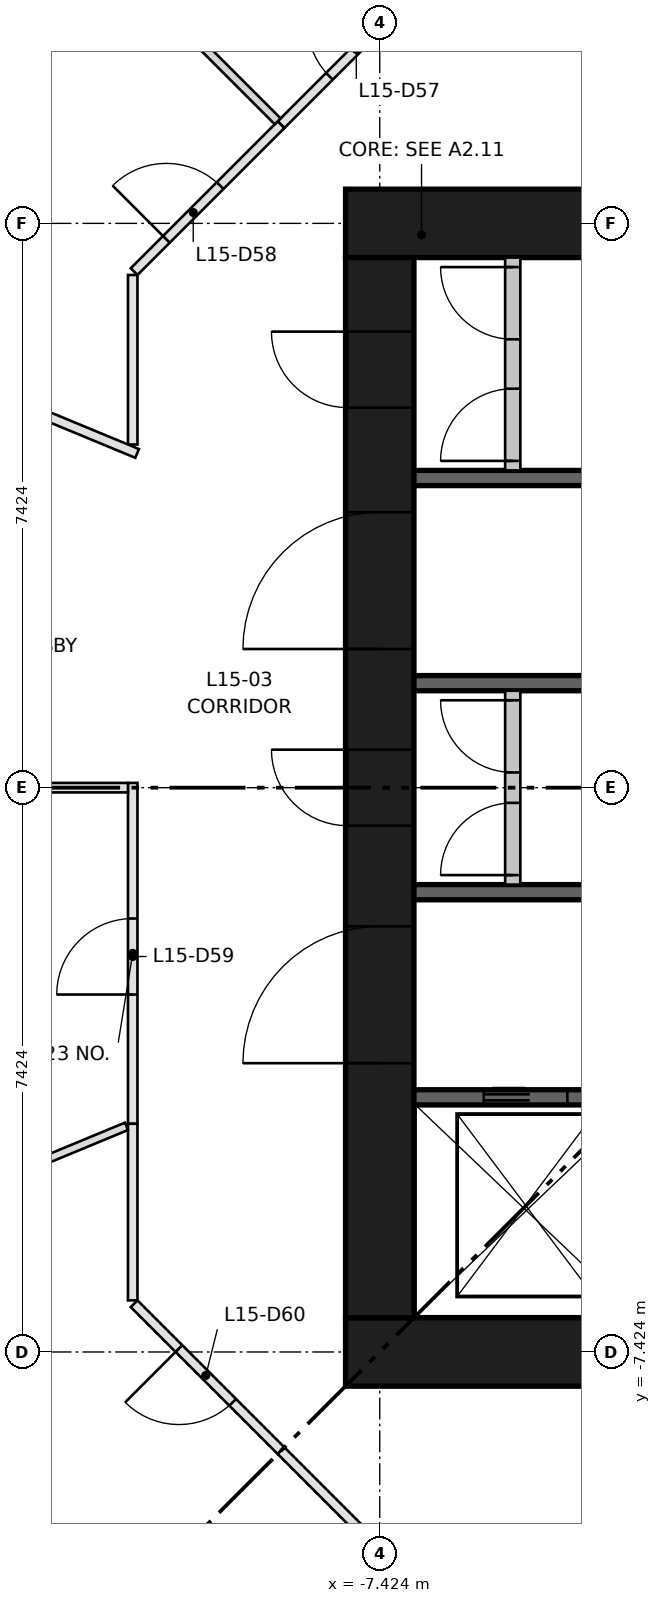
"""IFC4 building model, lengths in metres.
Left out: names, types, materials, properties, quantities, classifications, styles, units other than length and angle.
Written with IfcOpenShell. Run it as: python <this file> out.ifc"""

import sys

from ifc_helpers import new_model, si_unit, direction, frame, frame_2d, origin, place, context, subcontext, project, spatial, rectangle, extrude, element, fill, save


model = new_model("IFC4")
c1 = context("Model", 3, precision=1e-05, world=origin(), true_north=direction((0.0, 1.0)))
c2 = subcontext(c1, "Body", "Model", "MODEL_VIEW")
j1 = project(units=[si_unit("LENGTHUNIT", "METRE"), si_unit("PLANEANGLEUNIT", "RADIAN")], contexts=[c1])
p1 = place(None, origin())
s1 = spatial("IfcSite", under=j1, at=p1, CompositionType="ELEMENT")
p2 = place(p1, origin())
s2 = spatial("IfcBuilding", under=s1, at=p2, CompositionType="ELEMENT")
p3 = place(p2, frame((0.0, 0.0, 59.05)))
s3 = spatial("IfcBuildingStorey", under=s2, at=p3, CompositionType="ELEMENT", Elevation=59.05)
for number, where, z_axis, x_axis in (
    (1, (-7.874, -7.424, 0.0), (0.0, 0.0, 1.0), (1.0, 0.0, 0.0)),
    (2, (-7.874, 7.424, 0.0), (0.0, 0.0, 1.0), (1.0, 0.0, 0.0)),
):
    element("IfcWall", number, at=place(p3, frame(where, z_axis=z_axis, x_axis=x_axis)), inside=s3, PredefinedType="SHEAR", context=c2, shape_type="SweptSolid", body=[
        extrude(rectangle(XDim=15.748, YDim=0.9, at=frame_2d((7.874, 0.0))), origin(), (0.0, 0.0, 1.0), 3.65),
    ])
p4 = place(p3, frame((-7.424, -6.974, 0.0), z_axis=(0.0, 0.0, 1.0), x_axis=(0.0, 1.0, 0.0)))
e3 = element("IfcWall", 3, at=p4, inside=s3, PredefinedType="SHEAR", context=c2, shape_type="SweptSolid", body=[
    extrude(rectangle(XDim=13.948, YDim=0.9, at=frame_2d((6.974, 0.0))), origin(), (0.0, 0.0, 1.0), 3.65),
])
p5 = place(p4, frame((6.474, 0.0, 0.0)))
e4 = element("IfcOpeningElement", 4, at=p5, cuts=e3, PredefinedType="OPENING", context=c2, shape_type="SweptSolid", body=[
    extrude(rectangle(XDim=1.0, YDim=2.1, at=frame_2d((0.5, 1.05))), frame((0.0, 0.46, 0.0), z_axis=(0.0, -1.0, 0.0), x_axis=(1.0, 0.0, 0.0)), (0.0, 0.0, 1.0), 0.92),
])
p6 = place(p4, frame((3.35, 0.0, 0.0)))
e5 = element("IfcOpeningElement", 5, at=p6, cuts=e3, PredefinedType="OPENING", context=c2, shape_type="SweptSolid", body=[
    extrude(rectangle(XDim=1.8, YDim=2.1, at=frame_2d((0.9, 1.05))), frame((0.0, 0.46, 0.0), z_axis=(0.0, -1.0, 0.0), x_axis=(1.0, 0.0, 0.0)), (0.0, 0.0, 1.0), 0.92),
])
p7 = place(p4, frame((8.799, 0.0, 0.0)))
e6 = element("IfcOpeningElement", 6, at=p7, cuts=e3, PredefinedType="OPENING", context=c2, shape_type="SweptSolid", body=[
    extrude(rectangle(XDim=1.8, YDim=2.1, at=frame_2d((0.9, 1.05))), frame((0.0, 0.46, 0.0), z_axis=(0.0, -1.0, 0.0), x_axis=(1.0, 0.0, 0.0)), (0.0, 0.0, 1.0), 0.92),
])
p8 = place(p4, frame((11.974, 0.0, 0.0)))
e7 = element("IfcOpeningElement", 7, at=p8, cuts=e3, PredefinedType="OPENING", context=c2, shape_type="SweptSolid", body=[
    extrude(rectangle(XDim=1.0, YDim=2.1, at=frame_2d((0.5, 1.05))), frame((0.0, 0.46, 0.0), z_axis=(0.0, -1.0, 0.0), x_axis=(1.0, 0.0, 0.0)), (0.0, 0.0, 1.0), 0.92),
])
p9 = place(p3, frame((-6.974, -4.074, 0.0), z_axis=(0.0, 0.0, 1.0), x_axis=(1.0, 0.0, 0.0)))
e8 = element("IfcWall", 8, at=p9, inside=s3, PredefinedType="SHEAR", context=c2, shape_type="SweptSolid", body=[
    extrude(rectangle(XDim=13.948, YDim=0.2, at=frame_2d((6.974, 0.0))), origin(), (0.0, 0.0, 1.0), 3.3),
])
p10 = place(p9, frame((0.918, 0.0, 0.0)))
e9 = element("IfcOpeningElement", 9, at=p10, cuts=e8, PredefinedType="OPENING", context=c2, shape_type="SweptSolid", body=[
    extrude(rectangle(XDim=1.1, YDim=2.1, at=frame_2d((0.55, 1.05))), frame((0.0, 0.11, 0.0), z_axis=(0.0, -1.0, 0.0), x_axis=(1.0, 0.0, 0.0)), (0.0, 0.0, 1.0), 0.22),
])
p11 = place(p9, frame((4.055, 0.0, 0.0)))
e10 = element("IfcOpeningElement", 10, at=p11, cuts=e8, PredefinedType="OPENING", context=c2, shape_type="SweptSolid", body=[
    extrude(rectangle(XDim=1.1, YDim=2.1, at=frame_2d((0.55, 1.05))), frame((0.0, 0.11, 0.0), z_axis=(0.0, -1.0, 0.0), x_axis=(1.0, 0.0, 0.0)), (0.0, 0.0, 1.0), 0.22),
])
p12 = place(p9, frame((6.658, 0.0, 0.0)))
e11 = element("IfcOpeningElement", 11, at=p12, cuts=e8, PredefinedType="OPENING", context=c2, shape_type="SweptSolid", body=[
    extrude(rectangle(XDim=1.0, YDim=2.1, at=frame_2d((0.5, 1.05))), frame((0.0, 0.11, 0.0), z_axis=(0.0, -1.0, 0.0), x_axis=(1.0, 0.0, 0.0)), (0.0, 0.0, 1.0), 0.22),
])
p13 = place(p9, frame((8.627, 0.0, 0.0)))
e12 = element("IfcOpeningElement", 12, at=p13, cuts=e8, PredefinedType="OPENING", context=c2, shape_type="SweptSolid", body=[
    extrude(rectangle(XDim=1.0, YDim=2.1, at=frame_2d((0.5, 1.05))), frame((0.0, 0.11, 0.0), z_axis=(0.0, -1.0, 0.0), x_axis=(1.0, 0.0, 0.0)), (0.0, 0.0, 1.0), 0.22),
])
p14 = place(p9, frame((10.595, 0.0, 0.0)))
e13 = element("IfcOpeningElement", 13, at=p14, cuts=e8, PredefinedType="OPENING", context=c2, shape_type="SweptSolid", body=[
    extrude(rectangle(XDim=1.0, YDim=2.1, at=frame_2d((0.5, 1.05))), frame((0.0, 0.11, 0.0), z_axis=(0.0, -1.0, 0.0), x_axis=(1.0, 0.0, 0.0)), (0.0, 0.0, 1.0), 0.22),
])
p15 = place(p9, frame((12.564, 0.0, 0.0)))
e14 = element("IfcOpeningElement", 14, at=p15, cuts=e8, PredefinedType="OPENING", context=c2, shape_type="SweptSolid", body=[
    extrude(rectangle(XDim=1.0, YDim=2.1, at=frame_2d((0.5, 1.05))), frame((0.0, 0.11, 0.0), z_axis=(0.0, -1.0, 0.0), x_axis=(1.0, 0.0, 0.0)), (0.0, 0.0, 1.0), 0.22),
])
p16 = place(p3, frame((-6.974, 4.074, 0.0), z_axis=(0.0, 0.0, 1.0), x_axis=(1.0, 0.0, 0.0)))
e15 = element("IfcWall", 15, at=p16, inside=s3, PredefinedType="SHEAR", context=c2, shape_type="SweptSolid", body=[
    extrude(rectangle(XDim=6.974, YDim=0.2, at=frame_2d((3.487, 0.0))), origin(), (0.0, 0.0, 1.0), 3.3),
])
for number, where, z_axis, x_axis in (
    (16, (-6.974, -1.375, 0.0), (0.0, 0.0, 1.0), (1.0, 0.0, 0.0)),
    (17, (-6.974, 1.375, 0.0), (0.0, 0.0, 1.0), (1.0, 0.0, 0.0)),
):
    element("IfcWall", number, at=place(p3, frame(where, z_axis=z_axis, x_axis=x_axis)), inside=s3, PredefinedType="SHEAR", context=c2, shape_type="SweptSolid", body=[
        extrude(rectangle(XDim=2.6, YDim=0.2, at=frame_2d((1.3, 0.0))), origin(), (0.0, 0.0, 1.0), 3.3),
    ])
p17 = place(p3, frame((-5.674, -1.275, 0.0), z_axis=(0.0, 0.0, 1.0), x_axis=(0.0, 1.0, 0.0)))
e18 = element("IfcWall", 18, at=p17, inside=s3, PredefinedType="PARTITIONING", context=c2, shape_type="SweptSolid", body=[
    extrude(rectangle(XDim=2.55, YDim=0.2, at=frame_2d((1.275, 0.0))), origin(), (0.0, 0.0, 1.0), 3.3),
])
p18 = place(p17, frame((0.125, 0.0, 0.0)))
e19 = element("IfcOpeningElement", 19, at=p18, cuts=e18, PredefinedType="OPENING", context=c2, shape_type="SweptSolid", body=[
    extrude(rectangle(XDim=0.95, YDim=2.1, at=frame_2d((0.475, 1.05))), frame((0.0, 0.11, 0.0), z_axis=(0.0, -1.0, 0.0), x_axis=(1.0, 0.0, 0.0)), (0.0, 0.0, 1.0), 0.22),
])
p19 = place(p17, frame((1.475, 0.0, 0.0)))
e20 = element("IfcOpeningElement", 20, at=p19, cuts=e18, PredefinedType="OPENING", context=c2, shape_type="SweptSolid", body=[
    extrude(rectangle(XDim=0.95, YDim=2.1, at=frame_2d((0.475, 1.05))), frame((0.0, 0.11, 0.0), z_axis=(0.0, -1.0, 0.0), x_axis=(1.0, 0.0, 0.0)), (0.0, 0.0, 1.0), 0.22),
])
p20 = place(p3, frame((-5.674, 4.174, 0.0), z_axis=(0.0, 0.0, 1.0), x_axis=(0.0, 1.0, 0.0)))
e21 = element("IfcWall", 21, at=p20, inside=s3, PredefinedType="PARTITIONING", context=c2, shape_type="SweptSolid", body=[
    extrude(rectangle(XDim=2.8, YDim=0.2, at=frame_2d((1.4, 0.0))), origin(), (0.0, 0.0, 1.0), 3.3),
])
p21 = place(p20, frame((0.125, 0.0, 0.0)))
e22 = element("IfcOpeningElement", 22, at=p21, cuts=e21, PredefinedType="OPENING", context=c2, shape_type="SweptSolid", body=[
    extrude(rectangle(XDim=0.95, YDim=2.1, at=frame_2d((0.475, 1.05))), frame((0.0, 0.11, 0.0), z_axis=(0.0, -1.0, 0.0), x_axis=(1.0, 0.0, 0.0)), (0.0, 0.0, 1.0), 0.22),
])
p22 = place(p20, frame((1.725, 0.0, 0.0)))
e23 = element("IfcOpeningElement", 23, at=p22, cuts=e21, PredefinedType="OPENING", context=c2, shape_type="SweptSolid", body=[
    extrude(rectangle(XDim=0.95, YDim=2.1, at=frame_2d((0.475, 1.05))), frame((0.0, 0.11, 0.0), z_axis=(0.0, -1.0, 0.0), x_axis=(1.0, 0.0, 0.0)), (0.0, 0.0, 1.0), 0.22),
])
p23 = place(p3, frame((-8.722, 8.722, 0.0), z_axis=(0.0, 0.0, 1.0), x_axis=(0.707062130741, 0.707151428813, 0.0)))
e24 = element("IfcWall", 24, at=p23, inside=s3, PredefinedType="PARTITIONING", context=c2, shape_type="SweptSolid", body=[
    extrude(rectangle(XDim=2.734, YDim=0.125, at=frame_2d((1.367, 0.0))), origin(), (0.0, 0.0, 1.0), 3.3),
])
p24 = place(p23, frame((0.9, 0.0, 0.0)))
e25 = element("IfcOpeningElement", 25, at=p24, cuts=e24, PredefinedType="OPENING", context=c2, shape_type="SweptSolid", body=[
    extrude(rectangle(XDim=1.0, YDim=2.1, at=frame_2d((0.5, 1.05))), frame((0.0, 0.073, 0.0), z_axis=(0.0, -1.0, 0.0), x_axis=(1.0, 0.0, 0.0)), (0.0, 0.0, 1.0), 0.145),
])
p25 = place(p3, frame((-10.674, 4.515, 0.0), z_axis=(0.0, 0.0, 1.0), x_axis=(0.0, 1.0, 0.0)))
e26 = element("IfcWall", 26, at=p25, inside=s3, PredefinedType="PARTITIONING", context=c2, shape_type="SweptSolid", body=[
    extrude(rectangle(XDim=2.23, YDim=0.125, at=frame_2d((1.115, 0.0))), origin(), (0.0, 0.0, 1.0), 3.3),
])
p26 = place(p3, frame((-10.656, 6.789, 0.0), z_axis=(0.0, 0.0, 1.0), x_axis=(0.707151428813, 0.707062130741, 0.0)))
e27 = element("IfcWall", 27, at=p26, inside=s3, PredefinedType="PARTITIONING", context=c2, shape_type="SweptSolid", body=[
    extrude(rectangle(XDim=2.734, YDim=0.125, at=frame_2d((1.367, 0.0))), origin(), (0.0, 0.0, 1.0), 3.3),
])
p27 = place(p26, frame((0.6, 0.0, 0.0)))
e28 = element("IfcOpeningElement", 28, at=p27, cuts=e27, PredefinedType="OPENING", context=c2, shape_type="SweptSolid", body=[
    extrude(rectangle(XDim=1.0, YDim=2.1, at=frame_2d((0.5, 1.05))), frame((0.0, 0.073, 0.0), z_axis=(0.0, -1.0, 0.0), x_axis=(1.0, 0.0, 0.0)), (0.0, 0.0, 1.0), 0.145),
])
p28 = place(p3, frame((-10.674, -4.421, 0.0), z_axis=(0.0, 0.0, 1.0), x_axis=(0.0, 1.0, 0.0)))
e29 = element("IfcWall", 29, at=p28, inside=s3, PredefinedType="PARTITIONING", context=c2, shape_type="SweptSolid", body=[
    extrude(rectangle(XDim=4.484, YDim=0.125, at=frame_2d((2.242, 0.0))), origin(), (0.0, 0.0, 1.0), 3.3),
])
p29 = place(p28, frame((1.7, 0.0, 0.0)))
e30 = element("IfcOpeningElement", 30, at=p29, cuts=e29, PredefinedType="OPENING", context=c2, shape_type="SweptSolid", body=[
    extrude(rectangle(XDim=1.0, YDim=2.1, at=frame_2d((0.5, 1.05))), frame((0.0, 0.073, 0.0), z_axis=(0.0, -1.0, 0.0), x_axis=(1.0, 0.0, 0.0)), (0.0, 0.0, 1.0), 0.145),
])
p30 = place(p3, frame((-10.674, -6.745, 0.0), z_axis=(0.0, 0.0, 1.0), x_axis=(0.0, 1.0, 0.0)))
e31 = element("IfcWall", 31, at=p30, inside=s3, PredefinedType="PARTITIONING", context=c2, shape_type="SweptSolid", body=[
    extrude(rectangle(XDim=2.324, YDim=0.125, at=frame_2d((1.162, 0.0))), origin(), (0.0, 0.0, 1.0), 3.3),
])
p31 = place(p3, frame((-8.722, -8.722, 0.0), z_axis=(0.0, 0.0, 1.0), x_axis=(-0.707151428813, 0.707062130741, 0.0)))
e32 = element("IfcWall", 32, at=p31, inside=s3, PredefinedType="PARTITIONING", context=c2, shape_type="SweptSolid", body=[
    extrude(rectangle(XDim=2.734, YDim=0.125, at=frame_2d((1.367, 0.0))), origin(), (0.0, 0.0, 1.0), 3.3),
])
p32 = place(p31, frame((0.9, 0.0, 0.0)))
e33 = element("IfcOpeningElement", 33, at=p32, cuts=e32, PredefinedType="OPENING", context=c2, shape_type="SweptSolid", body=[
    extrude(rectangle(XDim=1.0, YDim=2.1, at=frame_2d((0.5, 1.05))), frame((0.0, 0.073, 0.0), z_axis=(0.0, -1.0, 0.0), x_axis=(1.0, 0.0, 0.0)), (0.0, 0.0, 1.0), 0.145),
])
p33 = place(p3, frame((-6.789, -10.656, 0.0), z_axis=(0.0, 0.0, 1.0), x_axis=(-0.707062130741, 0.707151428813, 0.0)))
e34 = element("IfcWall", 34, at=p33, inside=s3, PredefinedType="PARTITIONING", context=c2, shape_type="SweptSolid", body=[
    extrude(rectangle(XDim=2.734, YDim=0.125, at=frame_2d((1.367, 0.0))), origin(), (0.0, 0.0, 1.0), 3.3),
])
p34 = place(p3, frame((-8.767, 8.767, 0.0), z_axis=(0.0, 0.0, 1.0), x_axis=(-0.707106781187, 0.707106781187, 0.0)))
e35 = element("IfcWall", 35, at=p34, inside=s3, PredefinedType="PARTITIONING", context=c2, shape_type="SweptSolid", body=[
    extrude(rectangle(XDim=5.912, YDim=0.11, at=frame_2d((2.956, 0.0))), origin(), (0.0, 0.0, 1.0), 3.3),
])
p35 = place(p3, frame((-10.616, 4.397, 0.0), z_axis=(0.0, 0.0, 1.0), x_axis=(-0.923884549049, 0.382671321147, 0.0)))
e36 = element("IfcWall", 36, at=p35, inside=s3, PredefinedType="PARTITIONING", context=c2, shape_type="SweptSolid", body=[
    extrude(rectangle(XDim=3.149, YDim=0.125, at=frame_2d((1.575, 0.0))), origin(), (0.0, 0.0, 1.0), 3.3),
])
p36 = place(p3, frame((-10.737, 0.0, 0.0), z_axis=(0.0, 0.0, 1.0), x_axis=(-1.0, 0.0, 0.0)))
e37 = element("IfcWall", 37, at=p36, inside=s3, PredefinedType="PARTITIONING", context=c2, shape_type="SweptSolid", body=[
    extrude(rectangle(XDim=3.774, YDim=0.125, at=frame_2d((1.887, 0.0))), origin(), (0.0, 0.0, 1.0), 3.3),
])
p37 = place(p3, frame((-10.757, -4.456, 0.0), z_axis=(0.0, 0.0, 1.0), x_axis=(-0.923879826967, -0.382682721486, 0.0)))
e38 = element("IfcWall", 38, at=p37, inside=s3, PredefinedType="PARTITIONING", context=c2, shape_type="SweptSolid", body=[
    extrude(rectangle(XDim=2.997, YDim=0.105, at=frame_2d((1.499, 0.0))), origin(), (0.0, 0.0, 1.0), 3.3),
])
p38 = place(p10, origin())
e39 = element("IfcDoor", 39, at=p38, inside=s3, OperationType="DOUBLE_DOOR_SLIDING", PredefinedType="DOOR", context=c2, shape_type="SweptSolid", body=[
    extrude(rectangle(XDim=1.1, YDim=2.1, at=frame_2d((0.55, 1.05))), frame((0.0, 0.025, 0.0), z_axis=(0.0, -1.0, 0.0), x_axis=(1.0, 0.0, 0.0)), (0.0, 0.0, 1.0), 0.05),
])
fill(e9, e39)
p39 = place(p18, origin())
e40 = element("IfcDoor", 40, at=p39, inside=s3, OperationType="SINGLE_SWING_LEFT", PredefinedType="DOOR", context=c2, shape_type="SweptSolid", body=[
    extrude(rectangle(XDim=0.95, YDim=2.1, at=frame_2d((0.475, 1.05))), frame((0.0, 0.025, 0.0), z_axis=(0.0, -1.0, 0.0), x_axis=(1.0, 0.0, 0.0)), (0.0, 0.0, 1.0), 0.05),
])
fill(e19, e40)
p40 = place(p19, origin())
e41 = element("IfcDoor", 41, at=p40, inside=s3, OperationType="SINGLE_SWING_RIGHT", PredefinedType="DOOR", context=c2, shape_type="SweptSolid", body=[
    extrude(rectangle(XDim=0.95, YDim=2.1, at=frame_2d((0.475, 1.05))), frame((0.0, 0.025, 0.0), z_axis=(0.0, -1.0, 0.0), x_axis=(1.0, 0.0, 0.0)), (0.0, 0.0, 1.0), 0.05),
])
fill(e20, e41)
p41 = place(p21, origin())
e42 = element("IfcDoor", 42, at=p41, inside=s3, OperationType="SINGLE_SWING_LEFT", PredefinedType="DOOR", context=c2, shape_type="SweptSolid", body=[
    extrude(rectangle(XDim=0.95, YDim=2.1, at=frame_2d((0.475, 1.05))), frame((0.0, 0.025, 0.0), z_axis=(0.0, -1.0, 0.0), x_axis=(1.0, 0.0, 0.0)), (0.0, 0.0, 1.0), 0.05),
])
fill(e22, e42)
p42 = place(p22, origin())
e43 = element("IfcDoor", 43, at=p42, inside=s3, OperationType="SINGLE_SWING_RIGHT", PredefinedType="DOOR", context=c2, shape_type="SweptSolid", body=[
    extrude(rectangle(XDim=0.95, YDim=2.1, at=frame_2d((0.475, 1.05))), frame((0.0, 0.025, 0.0), z_axis=(0.0, -1.0, 0.0), x_axis=(1.0, 0.0, 0.0)), (0.0, 0.0, 1.0), 0.05),
])
fill(e23, e43)
p43 = place(p5, origin())
e44 = element("IfcDoor", 44, at=p43, inside=s3, OperationType="SINGLE_SWING_RIGHT", PredefinedType="DOOR", context=c2, shape_type="SweptSolid", body=[
    extrude(rectangle(XDim=1.0, YDim=2.1, at=frame_2d((0.5, 1.05))), frame((0.0, 0.45, 0.0), z_axis=(0.0, -1.0, 0.0), x_axis=(1.0, 0.0, 0.0)), (0.0, 0.0, 1.0), 0.05),
])
fill(e4, e44)
p44 = place(p6, origin())
e45 = element("IfcDoor", 45, at=p44, inside=s3, OperationType="DOUBLE_DOOR_SINGLE_SWING", PredefinedType="DOOR", context=c2, shape_type="SweptSolid", body=[
    extrude(rectangle(XDim=1.8, YDim=2.1, at=frame_2d((0.9, 1.05))), frame((0.0, 0.025, 0.0), z_axis=(0.0, -1.0, 0.0), x_axis=(1.0, 0.0, 0.0)), (0.0, 0.0, 1.0), 0.05),
])
fill(e5, e45)
p45 = place(p7, origin())
e46 = element("IfcDoor", 46, at=p45, inside=s3, OperationType="DOUBLE_DOOR_SINGLE_SWING", PredefinedType="DOOR", context=c2, shape_type="SweptSolid", body=[
    extrude(rectangle(XDim=1.8, YDim=2.1, at=frame_2d((0.9, 1.05))), frame((0.0, 0.025, 0.0), z_axis=(0.0, -1.0, 0.0), x_axis=(1.0, 0.0, 0.0)), (0.0, 0.0, 1.0), 0.05),
])
fill(e6, e46)
p46 = place(p8, origin())
e47 = element("IfcDoor", 47, at=p46, inside=s3, OperationType="SINGLE_SWING_RIGHT", PredefinedType="DOOR", context=c2, shape_type="SweptSolid", body=[
    extrude(rectangle(XDim=1.0, YDim=2.1, at=frame_2d((0.5, 1.05))), frame((0.0, 0.45, 0.0), z_axis=(0.0, -1.0, 0.0), x_axis=(1.0, 0.0, 0.0)), (0.0, 0.0, 1.0), 0.05),
])
fill(e7, e47)
p47 = place(p24, origin())
e48 = element("IfcDoor", 48, at=p47, inside=s3, OperationType="SINGLE_SWING_RIGHT", PredefinedType="DOOR", context=c2, shape_type="SweptSolid", body=[
    extrude(rectangle(XDim=1.0, YDim=2.1, at=frame_2d((0.5, 1.05))), frame((0.0, 0.025, 0.0), z_axis=(0.0, -1.0, 0.0), x_axis=(1.0, 0.0, 0.0)), (0.0, 0.0, 1.0), 0.05),
])
fill(e25, e48)
p48 = place(p27, origin())
e49 = element("IfcDoor", 49, at=p48, inside=s3, OperationType="SINGLE_SWING_LEFT", PredefinedType="DOOR", context=c2, shape_type="SweptSolid", body=[
    extrude(rectangle(XDim=1.0, YDim=2.1, at=frame_2d((0.5, 1.05))), frame((0.0, 0.025, 0.0), z_axis=(0.0, -1.0, 0.0), x_axis=(1.0, 0.0, 0.0)), (0.0, 0.0, 1.0), 0.05),
])
fill(e28, e49)
p49 = place(p29, origin())
e50 = element("IfcDoor", 50, at=p49, inside=s3, OperationType="SINGLE_SWING_LEFT", PredefinedType="DOOR", context=c2, shape_type="SweptSolid", body=[
    extrude(rectangle(XDim=1.0, YDim=2.1, at=frame_2d((0.5, 1.05))), frame((0.0, 0.025, 0.0), z_axis=(0.0, -1.0, 0.0), x_axis=(1.0, 0.0, 0.0)), (0.0, 0.0, 1.0), 0.05),
])
fill(e30, e50)
p50 = place(p32, origin())
e51 = element("IfcDoor", 51, at=p50, inside=s3, OperationType="SINGLE_SWING_RIGHT", PredefinedType="DOOR", context=c2, shape_type="SweptSolid", body=[
    extrude(rectangle(XDim=1.0, YDim=2.1, at=frame_2d((0.5, 1.05))), frame((0.0, 0.025, 0.0), z_axis=(0.0, -1.0, 0.0), x_axis=(1.0, 0.0, 0.0)), (0.0, 0.0, 1.0), 0.05),
])
fill(e33, e51)
save(model, sys.argv[1])
